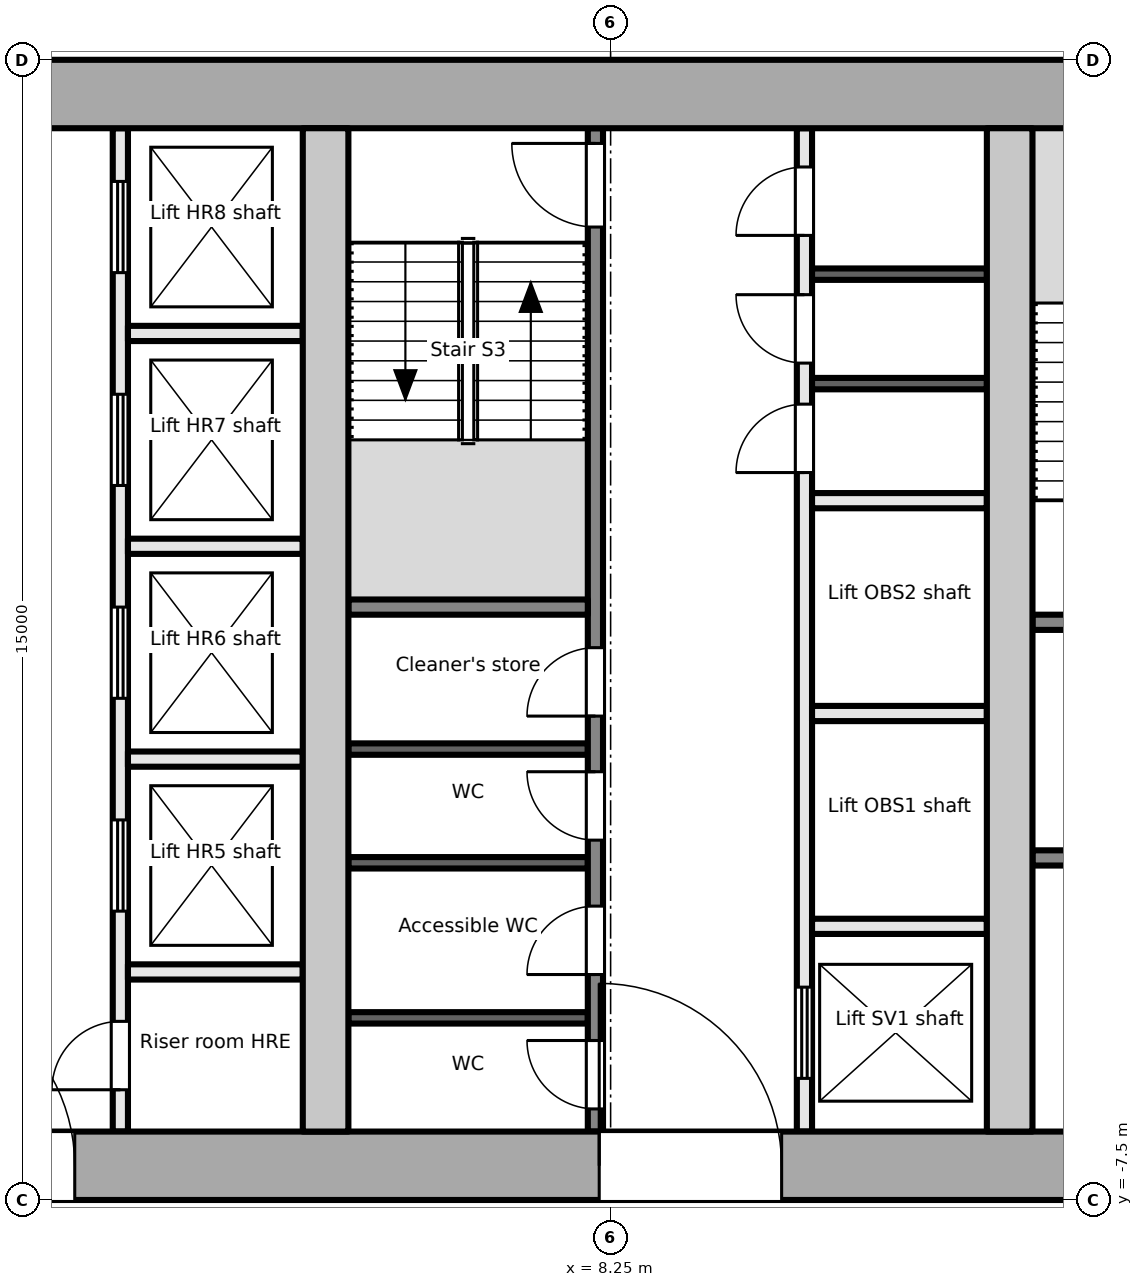
"""IFC4 building model, lengths in metres.
Left out: names, types, materials, properties, quantities, classifications, styles, units other than length and angle.
Written with IfcOpenShell. Run it as: python <this file> out.ifc"""

import sys

from ifc_helpers import new_model, si_unit, direction, frame, frame_2d, origin, place, context, subcontext, project, spatial, rectangle, extrude, element, fill, save


model = new_model("IFC4")
c1 = context("Model", 3, precision=1e-05, world=origin(), true_north=direction((0.0, 1.0)))
c2 = subcontext(c1, "Body", "Model", "MODEL_VIEW")
j1 = project(units=[si_unit("LENGTHUNIT", "METRE"), si_unit("PLANEANGLEUNIT", "RADIAN")], contexts=[c1])
p1 = place(None, origin())
s1 = spatial("IfcSite", under=j1, at=p1, CompositionType="ELEMENT")
p2 = place(p1, origin())
s2 = spatial("IfcBuilding", under=s1, at=p2, CompositionType="ELEMENT")
p3 = place(p2, frame((0.0, 0.0, 240.8)))
s3 = spatial("IfcBuildingStorey", under=s2, at=p3, CompositionType="ELEMENT", Elevation=240.8)
p4 = place(p3, frame((-18.0, -7.05, -0.2), z_axis=(0.0, 0.0, 1.0), x_axis=(1.0, 0.0, 0.0)))
e1 = element("IfcWall", 1, at=p4, inside=s3, PredefinedType="SHEAR", context=c2, shape_type="SweptSolid", body=[
    extrude(rectangle(XDim=36.0, YDim=0.9, at=frame_2d((18.0, 0.0))), origin(), (0.0, 0.0, 1.0), 3.9),
])
p5 = place(p4, frame((11.3, 0.0, 0.2)))
e2 = element("IfcOpeningElement", 2, at=p5, cuts=e1, PredefinedType="OPENING", context=c2, shape_type="SweptSolid", body=[
    extrude(rectangle(XDim=1.8, YDim=2.1, at=frame_2d((0.9, 1.05))), frame((0.0, 0.46, 0.0), z_axis=(0.0, -1.0, 0.0), x_axis=(1.0, 0.0, 0.0)), (0.0, 0.0, 1.0), 0.921),
])
p6 = place(p4, frame((16.8, 0.0, 0.2)))
e3 = element("IfcOpeningElement", 3, at=p6, cuts=e1, PredefinedType="OPENING", context=c2, shape_type="SweptSolid", body=[
    extrude(rectangle(XDim=2.4, YDim=2.1, at=frame_2d((1.2, 1.05))), frame((0.0, 0.46, 0.0), z_axis=(0.0, -1.0, 0.0), x_axis=(1.0, 0.0, 0.0)), (0.0, 0.0, 1.0), 0.921),
])
p7 = place(p4, frame((26.1, 0.0, 0.2)))
e4 = element("IfcOpeningElement", 4, at=p7, cuts=e1, PredefinedType="OPENING", context=c2, shape_type="SweptSolid", body=[
    extrude(rectangle(XDim=2.4, YDim=2.1, at=frame_2d((1.2, 1.05))), frame((0.0, 0.46, 0.0), z_axis=(0.0, -1.0, 0.0), x_axis=(1.0, 0.0, 0.0)), (0.0, 0.0, 1.0), 0.921),
])
p8 = place(p3, frame((-18.0, 7.05, -0.2), z_axis=(0.0, 0.0, 1.0), x_axis=(1.0, 0.0, 0.0)))
e5 = element("IfcWall", 5, at=p8, inside=s3, PredefinedType="SHEAR", context=c2, shape_type="SweptSolid", body=[
    extrude(rectangle(XDim=36.0, YDim=0.9, at=frame_2d((18.0, 0.0))), origin(), (0.0, 0.0, 1.0), 3.9),
])
for number, where, z_axis, x_axis in (
    (6, (4.5, -6.6, -0.2), (0.0, 0.0, 1.0), (0.0, 1.0, 0.0)),
    (7, (13.5, -6.6, -0.2), (0.0, 0.0, 1.0), (0.0, 1.0, 0.0)),
):
    element("IfcWall", number, at=place(p3, frame(where, z_axis=z_axis, x_axis=x_axis)), inside=s3, PredefinedType="SHEAR", context=c2, shape_type="SweptSolid", body=[
        extrude(rectangle(XDim=13.2, YDim=0.6, at=frame_2d((6.6, 0.0))), origin(), (0.0, 0.0, 1.0), 3.9),
    ])
p9 = place(p3, frame((13.8, -3.0, 0.0), z_axis=(0.0, 0.0, 1.0), x_axis=(1.0, 0.0, 0.0)))
e8 = element("IfcWall", 8, at=p9, inside=s3, PredefinedType="PARTITIONING", context=c2, shape_type="SweptSolid", body=[
    extrude(rectangle(XDim=3.3, YDim=0.2, at=frame_2d((1.65, 0.0))), origin(), (0.0, 0.0, 1.0), 3.7),
])
p10 = place(p9, frame((1.1, 0.0, 0.0)))
e9 = element("IfcOpeningElement", 9, at=p10, cuts=e8, PredefinedType="OPENING", context=c2, shape_type="SweptSolid", body=[
    extrude(rectangle(XDim=1.1, YDim=2.1, at=frame_2d((0.55, 1.05))), frame((0.0, 0.111, 0.0), z_axis=(0.0, -1.0, 0.0), x_axis=(1.0, 0.0, 0.0)), (0.0, 0.0, 1.0), 0.221),
])
p11 = place(p3, frame((13.8, 0.1, 0.0), z_axis=(0.0, 0.0, 1.0), x_axis=(1.0, 0.0, 0.0)))
e10 = element("IfcWall", 10, at=p11, inside=s3, PredefinedType="PARTITIONING", context=c2, shape_type="SweptSolid", body=[
    extrude(rectangle(XDim=3.3, YDim=0.2, at=frame_2d((1.65, 0.0))), origin(), (0.0, 0.0, 1.0), 3.7),
])
p12 = place(p11, frame((1.1, 0.0, 0.0)))
e11 = element("IfcOpeningElement", 11, at=p12, cuts=e10, PredefinedType="OPENING", context=c2, shape_type="SweptSolid", body=[
    extrude(rectangle(XDim=1.1, YDim=2.1, at=frame_2d((0.55, 1.05))), frame((0.0, 0.111, 0.0), z_axis=(0.0, -1.0, 0.0), x_axis=(1.0, 0.0, 0.0)), (0.0, 0.0, 1.0), 0.221),
])
p13 = place(p3, frame((1.8, -6.6, 0.0), z_axis=(0.0, 0.0, 1.0), x_axis=(0.0, 1.0, 0.0)))
e12 = element("IfcWall", 12, at=p13, inside=s3, PredefinedType="PARTITIONING", context=c2, shape_type="SweptSolid", body=[
    extrude(rectangle(XDim=13.2, YDim=0.2, at=frame_2d((6.6, 0.0))), origin(), (0.0, 0.0, 1.0), 3.7),
])
p14 = place(p13, frame((0.55, 0.0, 0.0)))
e13 = element("IfcOpeningElement", 13, at=p14, cuts=e12, PredefinedType="OPENING", context=c2, shape_type="SweptSolid", body=[
    extrude(rectangle(XDim=0.9, YDim=2.1, at=frame_2d((0.45, 1.05))), frame((0.0, 0.111, 0.0), z_axis=(0.0, -1.0, 0.0), x_axis=(1.0, 0.0, 0.0)), (0.0, 0.0, 1.0), 0.221),
])
p15 = place(p13, frame((2.9, 0.0, 0.0)))
e14 = element("IfcOpeningElement", 14, at=p15, cuts=e12, PredefinedType="OPENING", context=c2, shape_type="SweptSolid", body=[
    extrude(rectangle(XDim=1.2, YDim=2.1, at=frame_2d((0.6, 1.05))), frame((0.0, 0.111, 0.0), z_axis=(0.0, -1.0, 0.0), x_axis=(1.0, 0.0, 0.0)), (0.0, 0.0, 1.0), 0.221),
])
p16 = place(p13, frame((5.7, 0.0, 0.0)))
e15 = element("IfcOpeningElement", 15, at=p16, cuts=e12, PredefinedType="OPENING", context=c2, shape_type="SweptSolid", body=[
    extrude(rectangle(XDim=1.2, YDim=2.1, at=frame_2d((0.6, 1.05))), frame((0.0, 0.111, 0.0), z_axis=(0.0, -1.0, 0.0), x_axis=(1.0, 0.0, 0.0)), (0.0, 0.0, 1.0), 0.221),
])
p17 = place(p13, frame((8.5, 0.0, 0.0)))
e16 = element("IfcOpeningElement", 16, at=p17, cuts=e12, PredefinedType="OPENING", context=c2, shape_type="SweptSolid", body=[
    extrude(rectangle(XDim=1.2, YDim=2.1, at=frame_2d((0.6, 1.05))), frame((0.0, 0.111, 0.0), z_axis=(0.0, -1.0, 0.0), x_axis=(1.0, 0.0, 0.0)), (0.0, 0.0, 1.0), 0.221),
])
p18 = place(p13, frame((11.3, 0.0, 0.0)))
e17 = element("IfcOpeningElement", 17, at=p18, cuts=e12, PredefinedType="OPENING", context=c2, shape_type="SweptSolid", body=[
    extrude(rectangle(XDim=1.2, YDim=2.1, at=frame_2d((0.6, 1.05))), frame((0.0, 0.111, 0.0), z_axis=(0.0, -1.0, 0.0), x_axis=(1.0, 0.0, 0.0)), (0.0, 0.0, 1.0), 0.221),
])
for number, where, z_axis, x_axis in (
    (18, (1.9, -1.7, 0.0), (0.0, 0.0, 1.0), (1.0, 0.0, 0.0)),
    (19, (1.9, 1.1, 0.0), (0.0, 0.0, 1.0), (1.0, 0.0, 0.0)),
    (20, (1.9, 3.9, 0.0), (0.0, 0.0, 1.0), (1.0, 0.0, 0.0)),
    (21, (1.9, -4.5, 0.0), (0.0, 0.0, 1.0), (1.0, 0.0, 0.0)),
):
    element("IfcWall", number, at=place(p3, frame(where, z_axis=z_axis, x_axis=x_axis)), inside=s3, PredefinedType="PARTITIONING", context=c2, shape_type="SweptSolid", body=[
        extrude(rectangle(XDim=2.3, YDim=0.2, at=frame_2d((1.15, 0.0))), origin(), (0.0, 0.0, 1.0), 3.7),
    ])
p19 = place(p3, frame((8.05, -6.6, 0.0), z_axis=(0.0, 0.0, 1.0), x_axis=(0.0, 1.0, 0.0)))
e22 = element("IfcWall", 22, at=p19, inside=s3, PredefinedType="PARTITIONING", context=c2, shape_type="SweptSolid", body=[
    extrude(rectangle(XDim=13.2, YDim=0.2, at=frame_2d((6.6, 0.0))), origin(), (0.0, 0.0, 1.0), 3.7),
])
p20 = place(p19, frame((0.298, 0.0, 0.0)))
e23 = element("IfcOpeningElement", 23, at=p20, cuts=e22, PredefinedType="OPENING", context=c2, shape_type="SweptSolid", body=[
    extrude(rectangle(XDim=0.9, YDim=2.1, at=frame_2d((0.45, 1.05))), frame((0.0, 0.111, 0.0), z_axis=(0.0, -1.0, 0.0), x_axis=(1.0, 0.0, 0.0)), (0.0, 0.0, 1.0), 0.221),
])
p21 = place(p19, frame((2.066, 0.0, 0.0)))
e24 = element("IfcOpeningElement", 24, at=p21, cuts=e22, PredefinedType="OPENING", context=c2, shape_type="SweptSolid", body=[
    extrude(rectangle(XDim=0.9, YDim=2.1, at=frame_2d((0.45, 1.05))), frame((0.0, 0.111, 0.0), z_axis=(0.0, -1.0, 0.0), x_axis=(1.0, 0.0, 0.0)), (0.0, 0.0, 1.0), 0.221),
])
p22 = place(p19, frame((3.834, 0.0, 0.0)))
e25 = element("IfcOpeningElement", 25, at=p22, cuts=e22, PredefinedType="OPENING", context=c2, shape_type="SweptSolid", body=[
    extrude(rectangle(XDim=0.9, YDim=2.1, at=frame_2d((0.45, 1.05))), frame((0.0, 0.111, 0.0), z_axis=(0.0, -1.0, 0.0), x_axis=(1.0, 0.0, 0.0)), (0.0, 0.0, 1.0), 0.221),
])
p23 = place(p19, frame((5.466, 0.0, 0.0)))
e26 = element("IfcOpeningElement", 26, at=p23, cuts=e22, PredefinedType="OPENING", context=c2, shape_type="SweptSolid", body=[
    extrude(rectangle(XDim=0.9, YDim=2.1, at=frame_2d((0.45, 1.05))), frame((0.0, 0.111, 0.0), z_axis=(0.0, -1.0, 0.0), x_axis=(1.0, 0.0, 0.0)), (0.0, 0.0, 1.0), 0.221),
])
p24 = place(p19, frame((11.9, 0.0, 0.0)))
e27 = element("IfcOpeningElement", 27, at=p24, cuts=e22, PredefinedType="OPENING", context=c2, shape_type="SweptSolid", body=[
    extrude(rectangle(XDim=1.1, YDim=2.1, at=frame_2d((0.55, 1.05))), frame((0.0, 0.111, 0.0), z_axis=(0.0, -1.0, 0.0), x_axis=(1.0, 0.0, 0.0)), (0.0, 0.0, 1.0), 0.221),
])
p25 = place(p3, frame((10.8, -6.6, 0.0), z_axis=(0.0, 0.0, 1.0), x_axis=(0.0, 1.0, 0.0)))
e28 = element("IfcWall", 28, at=p25, inside=s3, PredefinedType="PARTITIONING", context=c2, shape_type="SweptSolid", body=[
    extrude(rectangle(XDim=13.2, YDim=0.2, at=frame_2d((6.6, 0.0))), origin(), (0.0, 0.0, 1.0), 3.7),
])
p26 = place(p25, frame((0.7, 0.0, 0.0)))
e29 = element("IfcOpeningElement", 29, at=p26, cuts=e28, PredefinedType="OPENING", context=c2, shape_type="SweptSolid", body=[
    extrude(rectangle(XDim=1.2, YDim=2.1, at=frame_2d((0.6, 1.05))), frame((0.0, 0.111, 0.0), z_axis=(0.0, -1.0, 0.0), x_axis=(1.0, 0.0, 0.0)), (0.0, 0.0, 1.0), 0.221),
])
p27 = place(p25, frame((8.67, 0.0, 0.0)))
e30 = element("IfcOpeningElement", 30, at=p27, cuts=e28, PredefinedType="OPENING", context=c2, shape_type="SweptSolid", body=[
    extrude(rectangle(XDim=0.9, YDim=2.1, at=frame_2d((0.45, 1.05))), frame((0.0, 0.111, 0.0), z_axis=(0.0, -1.0, 0.0), x_axis=(1.0, 0.0, 0.0)), (0.0, 0.0, 1.0), 0.221),
])
p28 = place(p25, frame((10.11, 0.0, 0.0)))
e31 = element("IfcOpeningElement", 31, at=p28, cuts=e28, PredefinedType="OPENING", context=c2, shape_type="SweptSolid", body=[
    extrude(rectangle(XDim=0.9, YDim=2.1, at=frame_2d((0.45, 1.05))), frame((0.0, 0.111, 0.0), z_axis=(0.0, -1.0, 0.0), x_axis=(1.0, 0.0, 0.0)), (0.0, 0.0, 1.0), 0.221),
])
p29 = place(p25, frame((11.79, 0.0, 0.0)))
e32 = element("IfcOpeningElement", 32, at=p29, cuts=e28, PredefinedType="OPENING", context=c2, shape_type="SweptSolid", body=[
    extrude(rectangle(XDim=0.9, YDim=2.1, at=frame_2d((0.45, 1.05))), frame((0.0, 0.111, 0.0), z_axis=(0.0, -1.0, 0.0), x_axis=(1.0, 0.0, 0.0)), (0.0, 0.0, 1.0), 0.221),
])
p30 = place(p3, frame((4.8, 0.3, 0.0), z_axis=(0.0, 0.0, 1.0), x_axis=(1.0, 0.0, 0.0)))
e33 = element("IfcWall", 33, at=p30, inside=s3, PredefinedType="PARTITIONING", context=c2, shape_type="SweptSolid", body=[
    extrude(rectangle(XDim=3.15, YDim=0.2, at=frame_2d((1.575, 0.0))), origin(), (0.0, 0.0, 1.0), 3.7),
])
for number, where, z_axis, x_axis in (
    (34, (4.8, -5.104, 0.0), (0.0, 0.0, 1.0), (1.0, 0.0, 0.0)),
    (35, (4.8, -3.064, 0.0), (0.0, 0.0, 1.0), (1.0, 0.0, 0.0)),
    (36, (4.8, -1.568, 0.0), (0.0, 0.0, 1.0), (1.0, 0.0, 0.0)),
):
    element("IfcWall", number, at=place(p3, frame(where, z_axis=z_axis, x_axis=x_axis)), inside=s3, PredefinedType="PARTITIONING", context=c2, shape_type="SweptSolid", body=[
        extrude(rectangle(XDim=3.15, YDim=0.15, at=frame_2d((1.575, 0.0))), origin(), (0.0, 0.0, 1.0), 3.7),
    ])
for number, where, z_axis, x_axis in (
    (37, (10.9, -3.9, 0.0), (0.0, 0.0, 1.0), (1.0, 0.0, 0.0)),
    (38, (10.9, -1.1, 0.0), (0.0, 0.0, 1.0), (1.0, 0.0, 0.0)),
    (39, (10.9, 1.7, 0.0), (0.0, 0.0, 1.0), (1.0, 0.0, 0.0)),
):
    element("IfcWall", number, at=place(p3, frame(where, z_axis=z_axis, x_axis=x_axis)), inside=s3, PredefinedType="PARTITIONING", context=c2, shape_type="SweptSolid", body=[
        extrude(rectangle(XDim=2.3, YDim=0.2, at=frame_2d((1.15, 0.0))), origin(), (0.0, 0.0, 1.0), 3.7),
    ])
for number, where, z_axis, x_axis in (
    (40, (10.9, 3.24, 0.0), (0.0, 0.0, 1.0), (1.0, 0.0, 0.0)),
    (41, (10.9, 4.68, 0.0), (0.0, 0.0, 1.0), (1.0, 0.0, 0.0)),
):
    element("IfcWall", number, at=place(p3, frame(where, z_axis=z_axis, x_axis=x_axis)), inside=s3, PredefinedType="PARTITIONING", context=c2, shape_type="SweptSolid", body=[
        extrude(rectangle(XDim=2.3, YDim=0.15, at=frame_2d((1.15, 0.0))), origin(), (0.0, 0.0, 1.0), 3.7),
    ])
p31 = place(p14, origin())
e42 = element("IfcDoor", 42, at=p31, inside=s3, OperationType="SINGLE_SWING_LEFT", PredefinedType="DOOR", context=c2, shape_type="SweptSolid", body=[
    extrude(rectangle(XDim=0.9, YDim=2.1, at=frame_2d((0.45, 1.05))), frame((0.0, 0.025, 0.0), z_axis=(0.0, -1.0, 0.0), x_axis=(1.0, 0.0, 0.0)), (0.0, 0.0, 1.0), 0.05),
])
fill(e13, e42)
p32 = place(p15, origin())
e43 = element("IfcDoor", 43, at=p32, inside=s3, OperationType="DOUBLE_DOOR_SLIDING", PredefinedType="DOOR", context=c2, shape_type="SweptSolid", body=[
    extrude(rectangle(XDim=1.2, YDim=2.1, at=frame_2d((0.6, 1.05))), frame((0.0, 0.025, 0.0), z_axis=(0.0, -1.0, 0.0), x_axis=(1.0, 0.0, 0.0)), (0.0, 0.0, 1.0), 0.05),
])
fill(e14, e43)
p33 = place(p16, origin())
e44 = element("IfcDoor", 44, at=p33, inside=s3, OperationType="DOUBLE_DOOR_SLIDING", PredefinedType="DOOR", context=c2, shape_type="SweptSolid", body=[
    extrude(rectangle(XDim=1.2, YDim=2.1, at=frame_2d((0.6, 1.05))), frame((0.0, 0.025, 0.0), z_axis=(0.0, -1.0, 0.0), x_axis=(1.0, 0.0, 0.0)), (0.0, 0.0, 1.0), 0.05),
])
fill(e15, e44)
p34 = place(p17, origin())
e45 = element("IfcDoor", 45, at=p34, inside=s3, OperationType="DOUBLE_DOOR_SLIDING", PredefinedType="DOOR", context=c2, shape_type="SweptSolid", body=[
    extrude(rectangle(XDim=1.2, YDim=2.1, at=frame_2d((0.6, 1.05))), frame((0.0, 0.025, 0.0), z_axis=(0.0, -1.0, 0.0), x_axis=(1.0, 0.0, 0.0)), (0.0, 0.0, 1.0), 0.05),
])
fill(e16, e45)
p35 = place(p18, origin())
e46 = element("IfcDoor", 46, at=p35, inside=s3, OperationType="DOUBLE_DOOR_SLIDING", PredefinedType="DOOR", context=c2, shape_type="SweptSolid", body=[
    extrude(rectangle(XDim=1.2, YDim=2.1, at=frame_2d((0.6, 1.05))), frame((0.0, 0.025, 0.0), z_axis=(0.0, -1.0, 0.0), x_axis=(1.0, 0.0, 0.0)), (0.0, 0.0, 1.0), 0.05),
])
fill(e17, e46)
p36 = place(p6, origin())
e47 = element("IfcDoor", 47, at=p36, inside=s3, OperationType="DOUBLE_DOOR_DOUBLE_SWING", PredefinedType="DOOR", context=c2, shape_type="SweptSolid", body=[
    extrude(rectangle(XDim=2.4, YDim=2.1, at=frame_2d((1.2, 1.05))), frame((0.0, 0.025, 0.0), z_axis=(0.0, -1.0, 0.0), x_axis=(1.0, 0.0, 0.0)), (0.0, 0.0, 1.0), 0.05),
])
fill(e3, e47)
p37 = place(p20, origin())
e48 = element("IfcDoor", 48, at=p37, inside=s3, OperationType="SINGLE_SWING_RIGHT", PredefinedType="DOOR", context=c2, shape_type="SweptSolid", body=[
    extrude(rectangle(XDim=0.9, YDim=2.1, at=frame_2d((0.45, 1.05))), frame((0.0, 0.025, 0.0), z_axis=(0.0, -1.0, 0.0), x_axis=(1.0, 0.0, 0.0)), (0.0, 0.0, 1.0), 0.05),
])
fill(e23, e48)
p38 = place(p21, origin())
e49 = element("IfcDoor", 49, at=p38, inside=s3, OperationType="SINGLE_SWING_LEFT", PredefinedType="DOOR", context=c2, shape_type="SweptSolid", body=[
    extrude(rectangle(XDim=0.9, YDim=2.1, at=frame_2d((0.45, 1.05))), frame((0.0, 0.025, 0.0), z_axis=(0.0, -1.0, 0.0), x_axis=(1.0, 0.0, 0.0)), (0.0, 0.0, 1.0), 0.05),
])
fill(e24, e49)
p39 = place(p22, origin())
e50 = element("IfcDoor", 50, at=p39, inside=s3, OperationType="SINGLE_SWING_RIGHT", PredefinedType="DOOR", context=c2, shape_type="SweptSolid", body=[
    extrude(rectangle(XDim=0.9, YDim=2.1, at=frame_2d((0.45, 1.05))), frame((0.0, 0.025, 0.0), z_axis=(0.0, -1.0, 0.0), x_axis=(1.0, 0.0, 0.0)), (0.0, 0.0, 1.0), 0.05),
])
fill(e25, e50)
p40 = place(p23, origin())
e51 = element("IfcDoor", 51, at=p40, inside=s3, OperationType="SINGLE_SWING_LEFT", PredefinedType="DOOR", context=c2, shape_type="SweptSolid", body=[
    extrude(rectangle(XDim=0.9, YDim=2.1, at=frame_2d((0.45, 1.05))), frame((0.0, 0.025, 0.0), z_axis=(0.0, -1.0, 0.0), x_axis=(1.0, 0.0, 0.0)), (0.0, 0.0, 1.0), 0.05),
])
fill(e26, e51)
p41 = place(p24, origin())
e52 = element("IfcDoor", 52, at=p41, inside=s3, OperationType="SINGLE_SWING_RIGHT", PredefinedType="DOOR", context=c2, shape_type="SweptSolid", body=[
    extrude(rectangle(XDim=1.1, YDim=2.1, at=frame_2d((0.55, 1.05))), frame((0.0, 0.025, 0.0), z_axis=(0.0, -1.0, 0.0), x_axis=(1.0, 0.0, 0.0)), (0.0, 0.0, 1.0), 0.05),
])
fill(e27, e52)
p42 = place(p7, origin())
e53 = element("IfcDoor", 53, at=p42, inside=s3, OperationType="DOUBLE_DOOR_DOUBLE_SWING", PredefinedType="DOOR", context=c2, shape_type="SweptSolid", body=[
    extrude(rectangle(XDim=2.4, YDim=2.1, at=frame_2d((1.2, 1.05))), frame((0.0, 0.025, 0.0), z_axis=(0.0, -1.0, 0.0), x_axis=(1.0, 0.0, 0.0)), (0.0, 0.0, 1.0), 0.05),
])
fill(e4, e53)
p43 = place(p26, origin())
e54 = element("IfcDoor", 54, at=p43, inside=s3, OperationType="DOUBLE_DOOR_SLIDING", PredefinedType="DOOR", context=c2, shape_type="SweptSolid", body=[
    extrude(rectangle(XDim=1.2, YDim=2.1, at=frame_2d((0.6, 1.05))), frame((0.0, 0.025, 0.0), z_axis=(0.0, -1.0, 0.0), x_axis=(1.0, 0.0, 0.0)), (0.0, 0.0, 1.0), 0.05),
])
fill(e29, e54)
p44 = place(p27, origin())
e55 = element("IfcDoor", 55, at=p44, inside=s3, OperationType="SINGLE_SWING_LEFT", PredefinedType="DOOR", context=c2, shape_type="SweptSolid", body=[
    extrude(rectangle(XDim=0.9, YDim=2.1, at=frame_2d((0.45, 1.05))), frame((0.0, 0.025, 0.0), z_axis=(0.0, -1.0, 0.0), x_axis=(1.0, 0.0, 0.0)), (0.0, 0.0, 1.0), 0.05),
])
fill(e30, e55)
p45 = place(p28, origin())
e56 = element("IfcDoor", 56, at=p45, inside=s3, OperationType="SINGLE_SWING_RIGHT", PredefinedType="DOOR", context=c2, shape_type="SweptSolid", body=[
    extrude(rectangle(XDim=0.9, YDim=2.1, at=frame_2d((0.45, 1.05))), frame((0.0, 0.025, 0.0), z_axis=(0.0, -1.0, 0.0), x_axis=(1.0, 0.0, 0.0)), (0.0, 0.0, 1.0), 0.05),
])
fill(e31, e56)
p46 = place(p29, origin())
e57 = element("IfcDoor", 57, at=p46, inside=s3, OperationType="SINGLE_SWING_LEFT", PredefinedType="DOOR", context=c2, shape_type="SweptSolid", body=[
    extrude(rectangle(XDim=0.9, YDim=2.1, at=frame_2d((0.45, 1.05))), frame((0.0, 0.025, 0.0), z_axis=(0.0, -1.0, 0.0), x_axis=(1.0, 0.0, 0.0)), (0.0, 0.0, 1.0), 0.05),
])
fill(e32, e57)
save(model, sys.argv[1])
